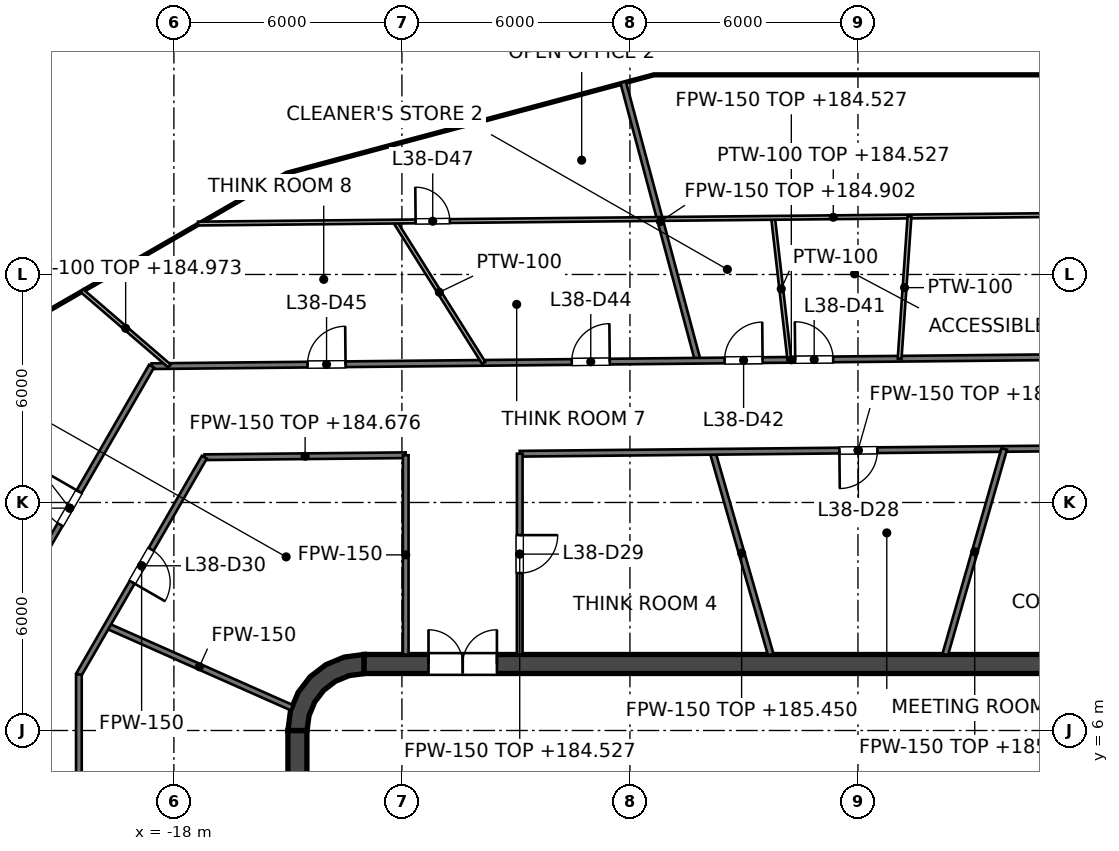
"""IFC4 building model, lengths in metres.
Left out: names, types, materials, properties, quantities, classifications, styles, units other than length and angle.
Written with IfcOpenShell. Run it as: python <this file> out.ifc"""

import sys

from ifc_helpers import new_model, si_unit, direction, frame, frame_2d, origin, place, context, subcontext, project, spatial, polyline, rectangle, outline, extrude, element, fill, save


model = new_model("IFC4")
c1 = context("Model", 3, precision=1e-05, world=origin(), true_north=direction((0.0, 1.0)))
c2 = subcontext(c1, "Body", "Model", "MODEL_VIEW")
j1 = project(units=[si_unit("LENGTHUNIT", "METRE"), si_unit("PLANEANGLEUNIT", "RADIAN")], contexts=[c1])
p1 = place(None, origin())
s1 = spatial("IfcSite", under=j1, at=p1, CompositionType="ELEMENT")
p2 = place(p1, origin())
s2 = spatial("IfcBuilding", under=s1, at=p2, CompositionType="ELEMENT")
p3 = place(p2, frame((0.0, 0.0, 181.6)))
s3 = spatial("IfcBuildingStorey", under=s2, at=p3, CompositionType="ELEMENT", Elevation=181.6)
p4 = place(p3, frame((-13.0, 7.75, 0.0), z_axis=(0.0, 0.0, 1.0), x_axis=(1.0, 0.0, 0.0)))
e1 = element("IfcWall", 1, at=p4, inside=s3, PredefinedType="SHEAR", context=c2, shape_type="SweptSolid", body=[
    extrude(rectangle(XDim=26.0, YDim=0.5, at=frame_2d((13.0, 0.0))), origin(), (0.0, 0.0, 1.0), 4.0),
])
p5 = place(p4, frame((1.7, 0.0, 0.0)))
e2 = element("IfcOpeningElement", 2, at=p5, cuts=e1, PredefinedType="OPENING", context=c2, shape_type="SweptSolid", body=[
    extrude(rectangle(XDim=1.8, YDim=2.1, at=frame_2d((0.9, 1.05))), frame((0.0, 0.25, 0.0), z_axis=(0.0, -1.0, 0.0), x_axis=(1.0, 0.0, 0.0)), (0.0, 0.0, 1.0), 0.5),
])
p6 = place(p4, frame((22.5, 0.0, 0.0)))
e3 = element("IfcOpeningElement", 3, at=p6, cuts=e1, PredefinedType="OPENING", context=c2, shape_type="SweptSolid", body=[
    extrude(rectangle(XDim=1.8, YDim=2.1, at=frame_2d((0.9, 1.05))), frame((0.0, 0.25, 0.0), z_axis=(0.0, -1.0, 0.0), x_axis=(1.0, 0.0, 0.0)), (0.0, 0.0, 1.0), 0.5),
])
p7 = place(p3, frame((-14.75, -6.0, 0.0), z_axis=(0.0, 0.0, 1.0), x_axis=(0.0, 1.0, 0.0)))
e4 = element("IfcWall", 4, at=p7, inside=s3, PredefinedType="SHEAR", context=c2, shape_type="SweptSolid", body=[
    extrude(rectangle(XDim=12.0, YDim=0.5, at=frame_2d((6.0, 0.0))), origin(), (0.0, 0.0, 1.0), 4.0),
])
p8 = place(p3, origin())
e5 = element("IfcWall", 5, at=p8, inside=s3, PredefinedType="SHEAR", context=c2, shape_type="SweptSolid", body=[
    extrude(outline(polyline([(-15.0, 6.0), (-14.496, 6.0), (-14.445, 6.387), (-14.295, 6.748), (-14.058, 7.058), (-13.748, 7.295), (-13.387, 7.445), (-13.0, 7.496), (-13.0, 8.0), (-13.518, 7.932), (-14.0, 7.732), (-14.414, 7.414), (-14.732, 7.0), (-14.932, 6.518), (-15.0, 6.0)])), origin(), (0.0, 0.0, 1.0), 4.0),
])
p9 = place(p3, frame((-9.0, 4.1, 0.0), z_axis=(0.0, 0.0, 1.0), x_axis=(0.0, 1.0, 0.0)))
e6 = element("IfcWall", 6, at=p9, inside=s3, PredefinedType="SOLIDWALL", context=c2, shape_type="SweptSolid", body=[
    extrude(rectangle(XDim=2.5, YDim=0.25, at=frame_2d((1.25, 0.0))), origin(), (0.0, 0.0, 1.0), 3.85),
])
p10 = place(p9, frame((0.65, 0.0, 0.0)))
e7 = element("IfcOpeningElement", 7, at=p10, cuts=e6, PredefinedType="OPENING", context=c2, shape_type="SweptSolid", body=[
    extrude(rectangle(XDim=1.2, YDim=2.1, at=frame_2d((0.6, 1.05))), frame((0.0, 0.125, 0.0), z_axis=(0.0, -1.0, 0.0), x_axis=(1.0, 0.0, 0.0)), (0.0, 0.0, 1.0), 0.25),
])
for number, where, z_axis, x_axis in (
    (8, (-3.15, 4.1, 0.0), (0.0, 0.0, 1.0), (0.0, 1.0, 0.0)),
    (9, (3.15, 4.1, 0.0), (0.0, 0.0, 1.0), (0.0, 1.0, 0.0)),
):
    element("IfcWall", number, at=place(p3, frame(where, z_axis=z_axis, x_axis=x_axis)), inside=s3, PredefinedType="SOLIDWALL", context=c2, shape_type="SweptSolid", body=[
        extrude(rectangle(XDim=2.5, YDim=0.25, at=frame_2d((1.25, 0.0))), origin(), (0.0, 0.0, 1.0), 3.85),
    ])
p11 = place(p3, frame((-9.125, 7.05, 0.0), z_axis=(0.0, 0.0, 1.0), x_axis=(1.0, 0.0, 0.0)))
e10 = element("IfcWall", 10, at=p11, inside=s3, PredefinedType="SOLIDWALL", context=c2, shape_type="SweptSolid", body=[
    extrude(rectangle(XDim=18.25, YDim=0.9, at=frame_2d((9.125, 0.0))), origin(), (0.0, 0.0, 1.0), 3.85),
])
p12 = place(p3, frame((-11.8, -7.5, 0.0), z_axis=(0.0, 0.0, 1.0), x_axis=(0.0, 1.0, 0.0)))
e11 = element("IfcWall", 11, at=p12, inside=s3, PredefinedType="SOLIDWALL", context=c2, shape_type="SweptSolid", body=[
    extrude(rectangle(XDim=15.0, YDim=0.4, at=frame_2d((7.5, 0.0))), origin(), (0.0, 0.0, 1.0), 3.85),
])
p13 = place(p12, frame((11.3, 0.0, 0.0)))
e12 = element("IfcOpeningElement", 12, at=p13, cuts=e11, PredefinedType="OPENING", context=c2, shape_type="SweptSolid", body=[
    extrude(rectangle(XDim=1.1, YDim=2.1, at=frame_2d((0.55, 1.05))), frame((0.0, 0.2, 0.0), z_axis=(0.0, -1.0, 0.0), x_axis=(1.0, 0.0, 0.0)), (0.0, 0.0, 1.0), 0.4),
])
p14 = place(p12, frame((8.4, 0.0, 0.0)))
e13 = element("IfcOpeningElement", 13, at=p14, cuts=e11, PredefinedType="OPENING", context=c2, shape_type="SweptSolid", body=[
    extrude(rectangle(XDim=1.1, YDim=2.1, at=frame_2d((0.55, 1.05))), frame((0.0, 0.2, 0.0), z_axis=(0.0, -1.0, 0.0), x_axis=(1.0, 0.0, 0.0)), (0.0, 0.0, 1.0), 0.4),
])
p15 = place(p12, frame((5.5, 0.0, 0.0)))
e14 = element("IfcOpeningElement", 14, at=p15, cuts=e11, PredefinedType="OPENING", context=c2, shape_type="SweptSolid", body=[
    extrude(rectangle(XDim=1.1, YDim=2.1, at=frame_2d((0.55, 1.05))), frame((0.0, 0.2, 0.0), z_axis=(0.0, -1.0, 0.0), x_axis=(1.0, 0.0, 0.0)), (0.0, 0.0, 1.0), 0.4),
])
p16 = place(p12, frame((13.697, 0.0, 0.0)))
e15 = element("IfcOpeningElement", 15, at=p16, cuts=e11, PredefinedType="OPENING", context=c2, shape_type="SweptSolid", body=[
    extrude(rectangle(XDim=0.9, YDim=2.1, at=frame_2d((0.45, 1.05))), frame((0.0, 0.2, 0.0), z_axis=(0.0, -1.0, 0.0), x_axis=(1.0, 0.0, 0.0)), (0.0, 0.0, 1.0), 0.4),
])
p17 = place(p12, frame((0.403, 0.0, 0.0)))
e16 = element("IfcOpeningElement", 16, at=p17, cuts=e11, PredefinedType="OPENING", context=c2, shape_type="SweptSolid", body=[
    extrude(rectangle(XDim=0.9, YDim=2.1, at=frame_2d((0.45, 1.05))), frame((0.0, 0.2, 0.0), z_axis=(0.0, -1.0, 0.0), x_axis=(1.0, 0.0, 0.0)), (0.0, 0.0, 1.0), 0.4),
])
e17 = element("IfcWall", 17, at=p8, inside=s3, PredefinedType="SOLIDWALL", context=c2, shape_type="SweptSolid", body=[
    extrude(outline(polyline([(-12.0, -5.925), (-12.0, -5.675), (-14.25, -5.675), (-14.25, -3.025), (-12.0, -3.025), (-12.0, -2.775), (-14.25, -2.775), (-14.25, -0.125), (-12.0, -0.125), (-12.0, 0.125), (-14.25, 0.125), (-14.25, 2.775), (-12.0, 2.775), (-12.0, 3.025), (-14.25, 3.025), (-14.25, 5.675), (-12.0, 5.675), (-12.0, 5.925), (-14.25, 5.925), (-14.5, 5.925), (-14.5, 5.675), (-14.5, 3.025), (-14.5, 2.775), (-14.5, 0.125), (-14.5, -0.125), (-14.5, -2.775), (-14.5, -3.025), (-14.5, -5.675), (-14.5, -5.925), (-14.25, -5.925), (-12.0, -5.925)])), origin(), (0.0, 0.0, 1.0), 3.85),
])
p18 = place(p3, frame((-6.178, 23.058, 0.0), z_axis=(0.0, 0.0, 1.0), x_axis=(0.258856186269, -0.965915873578, 0.0)))
e18 = element("IfcWall", 18, at=p18, inside=s3, PredefinedType="PARTITIONING", context=c2, shape_type="SweptSolid", body=[
    extrude(rectangle(XDim=7.587, YDim=0.15, at=frame_2d((3.793, 0.0))), origin(), (0.0, 0.0, 1.0), 3.302),
])
p19 = place(p3, frame((-3.827, 13.333, 0.0), z_axis=(0.0, 0.0, 1.0), x_axis=(0.275935525478, -0.961176147113, 0.0)))
e19 = element("IfcWall", 19, at=p19, inside=s3, PredefinedType="PARTITIONING", context=c2, shape_type="SweptSolid", body=[
    extrude(rectangle(XDim=5.548, YDim=0.15, at=frame_2d((2.774, 0.0))), origin(), (0.0, 0.0, 1.0), 3.85),
])
p20 = place(p3, frame((-19.76, 8.755, 0.0), z_axis=(0.0, 0.0, 1.0), x_axis=(0.91424834547, -0.405154245695, 0.0)))
e20 = element("IfcWall", 20, at=p20, inside=s3, PredefinedType="PARTITIONING", context=c2, shape_type="SweptSolid", body=[
    extrude(rectangle(XDim=5.318, YDim=0.15, at=frame_2d((2.659, 0.0))), origin(), (0.0, 0.0, 1.0), 2.995),
])
p21 = place(p3, frame((-17.194, 13.191, 0.0), z_axis=(0.0, 0.0, 1.0), x_axis=(0.999950394899, 0.009960308291, 0.0)))
e21 = element("IfcWall", 21, at=p21, inside=s3, PredefinedType="PARTITIONING", context=c2, shape_type="SweptSolid", body=[
    extrude(rectangle(XDim=5.294, YDim=0.15, at=frame_2d((2.647, 0.0))), origin(), (0.0, 0.0, 1.0), 3.076),
])
p22 = place(p3, frame((-8.9, 13.282, 0.0), z_axis=(0.0, 0.0, 1.0), x_axis=(0.99995056171, 0.009943547447, 0.0)))
e22 = element("IfcWall", 22, at=p22, inside=s3, PredefinedType="PARTITIONING", context=c2, shape_type="SweptSolid", body=[
    extrude(rectangle(XDim=17.801, YDim=0.15, at=frame_2d((8.9, 0.0))), origin(), (0.0, 0.0, 1.0), 2.927),
])
p23 = place(p22, frame((8.412, 0.0, 0.0)))
e23 = element("IfcOpeningElement", 23, at=p23, cuts=e22, PredefinedType="OPENING", context=c2, shape_type="SweptSolid", body=[
    extrude(rectangle(XDim=1.0, YDim=2.1, at=frame_2d((0.5, 1.05))), frame((0.0, 0.075, 0.0), z_axis=(0.0, -1.0, 0.0), x_axis=(1.0, 0.0, 0.0)), (0.0, 0.0, 1.0), 0.15),
])
p24 = place(p3, frame((-18.587, 15.587, 0.0), z_axis=(0.0, 0.0, 1.0), x_axis=(0.99995051, 0.009948746191, 0.0)))
e24 = element("IfcWall", 24, at=p24, inside=s3, PredefinedType="PARTITIONING", context=c2, shape_type="SweptSolid", body=[
    extrude(rectangle(XDim=33.669, YDim=0.15, at=frame_2d((16.834, 0.0))), origin(), (0.0, 0.0, 1.0), 2.927),
])
p25 = place(p24, frame((26.125, 0.0, 0.0)))
e25 = element("IfcOpeningElement", 25, at=p25, cuts=e24, PredefinedType="OPENING", context=c2, shape_type="SweptSolid", body=[
    extrude(rectangle(XDim=1.0, YDim=2.1, at=frame_2d((0.5, 1.05))), frame((0.0, 0.075, 0.0), z_axis=(0.0, -1.0, 0.0), x_axis=(1.0, 0.0, 0.0)), (0.0, 0.0, 1.0), 0.15),
])
p26 = place(p24, frame((16.936, 0.0, 0.0)))
e26 = element("IfcOpeningElement", 26, at=p26, cuts=e24, PredefinedType="OPENING", context=c2, shape_type="SweptSolid", body=[
    extrude(rectangle(XDim=1.0, YDim=2.1, at=frame_2d((0.5, 1.05))), frame((0.0, 0.075, 0.0), z_axis=(0.0, -1.0, 0.0), x_axis=(1.0, 0.0, 0.0)), (0.0, 0.0, 1.0), 0.15),
])
p27 = place(p24, frame((15.079, 0.0, 0.0)))
e27 = element("IfcOpeningElement", 27, at=p27, cuts=e24, PredefinedType="OPENING", context=c2, shape_type="SweptSolid", body=[
    extrude(rectangle(XDim=1.0, YDim=2.1, at=frame_2d((0.5, 1.05))), frame((0.0, 0.075, 0.0), z_axis=(0.0, -1.0, 0.0), x_axis=(1.0, 0.0, 0.0)), (0.0, 0.0, 1.0), 0.15),
])
p28 = place(p24, frame((11.056, 0.0, 0.0)))
e28 = element("IfcOpeningElement", 28, at=p28, cuts=e24, PredefinedType="OPENING", context=c2, shape_type="SweptSolid", body=[
    extrude(rectangle(XDim=1.0, YDim=2.1, at=frame_2d((0.5, 1.05))), frame((0.0, 0.075, 0.0), z_axis=(0.0, -1.0, 0.0), x_axis=(1.0, 0.0, 0.0)), (0.0, 0.0, 1.0), 0.15),
])
p29 = place(p24, frame((4.104, 0.0, 0.0)))
e29 = element("IfcOpeningElement", 29, at=p29, cuts=e24, PredefinedType="OPENING", context=c2, shape_type="SweptSolid", body=[
    extrude(rectangle(XDim=1.0, YDim=2.1, at=frame_2d((0.5, 1.05))), frame((0.0, 0.075, 0.0), z_axis=(0.0, -1.0, 0.0), x_axis=(1.0, 0.0, 0.0)), (0.0, 0.0, 1.0), 0.15),
])
p30 = place(p3, frame((-20.5, 7.474, 0.0), z_axis=(0.0, 0.0, 1.0), x_axis=(0.500012665616, 0.866018091164, 0.0)))
e30 = element("IfcWall", 30, at=p30, inside=s3, PredefinedType="PARTITIONING", context=c2, shape_type="SweptSolid", body=[
    extrude(rectangle(XDim=6.602, YDim=0.15, at=frame_2d((3.301, 0.0))), origin(), (0.0, 0.0, 1.0), 2.995),
])
p31 = place(p30, frame((2.803, 0.0, 0.0)))
e31 = element("IfcOpeningElement", 31, at=p31, cuts=e30, PredefinedType="OPENING", context=c2, shape_type="SweptSolid", body=[
    extrude(rectangle(XDim=1.0, YDim=2.1, at=frame_2d((0.5, 1.05))), frame((0.0, 0.075, 0.0), z_axis=(0.0, -1.0, 0.0), x_axis=(1.0, 0.0, 0.0)), (0.0, 0.0, 1.0), 0.15),
])
p32 = place(p3, frame((-22.9, 8.117, 0.0), z_axis=(0.0, 0.0, 1.0), x_axis=(0.499983791763, 0.866034761412, 0.0)))
e32 = element("IfcWall", 32, at=p32, inside=s3, PredefinedType="PARTITIONING", context=c2, shape_type="SweptSolid", body=[
    extrude(rectangle(XDim=8.626, YDim=0.15, at=frame_2d((4.313, 0.0))), origin(), (0.0, 0.0, 1.0), 2.995),
])
p33 = place(p32, frame((3.812, 0.0, 0.0)))
e33 = element("IfcOpeningElement", 33, at=p33, cuts=e32, PredefinedType="OPENING", context=c2, shape_type="SweptSolid", body=[
    extrude(rectangle(XDim=1.0, YDim=2.1, at=frame_2d((0.5, 1.05))), frame((0.0, 0.075, 0.0), z_axis=(0.0, -1.0, 0.0), x_axis=(1.0, 0.0, 0.0)), (0.0, 0.0, 1.0), 0.15),
])
p34 = place(p3, frame((2.296, 8.0, 0.0), z_axis=(0.0, 0.0, 1.0), x_axis=(0.275958345059, 0.961169595749, 0.0)))
e34 = element("IfcWall", 34, at=p34, inside=s3, PredefinedType="PARTITIONING", context=c2, shape_type="SweptSolid", body=[
    extrude(rectangle(XDim=5.628, YDim=0.15, at=frame_2d((2.814, 0.0))), origin(), (0.0, 0.0, 1.0), 3.85),
])
p35 = place(p3, frame((-8.9, 8.0, 0.0), z_axis=(0.0, 0.0, 1.0), x_axis=(0.0, 1.0, 0.0)))
e35 = element("IfcWall", 35, at=p35, inside=s3, PredefinedType="PARTITIONING", context=c2, shape_type="SweptSolid", body=[
    extrude(rectangle(XDim=5.283, YDim=0.15, at=frame_2d((2.642, 0.0))), origin(), (0.0, 0.0, 1.0), 2.927),
])
p36 = place(p35, frame((2.142, 0.0, 0.0)))
e36 = element("IfcOpeningElement", 36, at=p36, cuts=e35, PredefinedType="OPENING", context=c2, shape_type="SweptSolid", body=[
    extrude(rectangle(XDim=1.0, YDim=2.1, at=frame_2d((0.5, 1.05))), frame((0.0, 0.075, 0.0), z_axis=(0.0, -1.0, 0.0), x_axis=(1.0, 0.0, 0.0)), (0.0, 0.0, 1.0), 0.15),
])
p37 = place(p3, frame((-11.9, 8.0, 0.0), z_axis=(0.0, 0.0, 1.0), x_axis=(0.0, 1.0, 0.0)))
e37 = element("IfcWall", 37, at=p37, inside=s3, PredefinedType="PARTITIONING", context=c2, shape_type="SweptSolid", body=[
    extrude(rectangle(XDim=5.243, YDim=0.15, at=frame_2d((2.622, 0.0))), origin(), (0.0, 0.0, 1.0), 2.995),
])
p38 = place(p3, frame((-20.5, -7.095, 0.0), z_axis=(0.0, 0.0, 1.0), x_axis=(0.0, 1.0, 0.0)))
e38 = element("IfcWall", 38, at=p38, inside=s3, PredefinedType="PARTITIONING", context=c2, shape_type="SweptSolid", body=[
    extrude(rectangle(XDim=14.569, YDim=0.15, at=frame_2d((7.285, 0.0))), origin(), (0.0, 0.0, 1.0), 2.927),
])
p39 = place(p38, frame((10.234, 0.0, 0.0)))
e39 = element("IfcOpeningElement", 39, at=p39, cuts=e38, PredefinedType="OPENING", context=c2, shape_type="SweptSolid", body=[
    extrude(rectangle(XDim=1.0, YDim=2.1, at=frame_2d((0.5, 1.05))), frame((0.0, 0.075, 0.0), z_axis=(0.0, -1.0, 0.0), x_axis=(1.0, 0.0, 0.0)), (0.0, 0.0, 1.0), 0.15),
])
p40 = place(p38, frame((3.0, 0.0, 0.0)))
e40 = element("IfcOpeningElement", 40, at=p40, cuts=e38, PredefinedType="OPENING", context=c2, shape_type="SweptSolid", body=[
    extrude(rectangle(XDim=1.0, YDim=2.1, at=frame_2d((0.5, 1.05))), frame((0.0, 0.075, 0.0), z_axis=(0.0, -1.0, 0.0), x_axis=(1.0, 0.0, 0.0)), (0.0, 0.0, 1.0), 0.15),
])
p41 = place(p3, frame((-2.233, 19.49, 0.0), z_axis=(0.0, 0.0, 1.0), x_axis=(0.113808420458, -0.993502714356, 0.0)))
e41 = element("IfcWall", 41, at=p41, inside=s3, PredefinedType="PARTITIONING", context=c2, shape_type="SweptSolid", body=[
    extrude(rectangle(XDim=3.76, YDim=0.1, at=frame_2d((1.88, 0.0))), origin(), (0.0, 0.0, 1.0), 3.85),
])
p42 = place(p3, frame((-12.183, 19.391, 0.0), z_axis=(0.0, 0.0, 1.0), x_axis=(0.531972202613, -0.846761817542, 0.0)))
e42 = element("IfcWall", 42, at=p42, inside=s3, PredefinedType="PARTITIONING", context=c2, shape_type="SweptSolid", body=[
    extrude(rectangle(XDim=4.39, YDim=0.1, at=frame_2d((2.195, 0.0))), origin(), (0.0, 0.0, 1.0), 3.85),
])
p43 = place(p3, frame((-20.421, 17.575, 0.0), z_axis=(0.0, 0.0, 1.0), x_axis=(0.757939763132, -0.652324547648, 0.0)))
e43 = element("IfcWall", 43, at=p43, inside=s3, PredefinedType="PARTITIONING", context=c2, shape_type="SweptSolid", body=[
    extrude(rectangle(XDim=3.04, YDim=0.1, at=frame_2d((1.52, 0.0))), origin(), (0.0, 0.0, 1.0), 3.373),
])
p44 = place(p3, frame((-17.364, 19.34, 0.0), z_axis=(0.0, 0.0, 1.0), x_axis=(0.99995067692, 0.00993195487, 0.0)))
e44 = element("IfcWall", 44, at=p44, inside=s3, PredefinedType="PARTITIONING", context=c2, shape_type="SweptSolid", body=[
    extrude(rectangle(XDim=33.431, YDim=0.1, at=frame_2d((16.715, 0.0))), origin(), (0.0, 0.0, 1.0), 2.927),
])
p45 = place(p44, frame((25.126, 0.0, 0.0)))
e45 = element("IfcOpeningElement", 45, at=p45, cuts=e44, PredefinedType="OPENING", context=c2, shape_type="SweptSolid", body=[
    extrude(rectangle(XDim=0.9, YDim=2.1, at=frame_2d((0.45, 1.05))), frame((0.0, 0.05, 0.0), z_axis=(0.0, -1.0, 0.0), x_axis=(1.0, 0.0, 0.0)), (0.0, 0.0, 1.0), 0.1),
])
p46 = place(p44, frame((5.725, 0.0, 0.0)))
e46 = element("IfcOpeningElement", 46, at=p46, cuts=e44, PredefinedType="OPENING", context=c2, shape_type="SweptSolid", body=[
    extrude(rectangle(XDim=0.9, YDim=2.1, at=frame_2d((0.45, 1.05))), frame((0.0, 0.05, 0.0), z_axis=(0.0, -1.0, 0.0), x_axis=(1.0, 0.0, 0.0)), (0.0, 0.0, 1.0), 0.1),
])
p47 = place(p3, frame((1.096, 15.783, 0.0), z_axis=(0.0, 0.0, 1.0), x_axis=(0.06931808301, 0.99759460873, 0.0)))
e47 = element("IfcWall", 47, at=p47, inside=s3, PredefinedType="PARTITIONING", context=c2, shape_type="SweptSolid", body=[
    extrude(rectangle(XDim=3.751, YDim=0.1, at=frame_2d((1.875, 0.0))), origin(), (0.0, 0.0, 1.0), 3.85),
])
p48 = place(p10, origin())
e48 = element("IfcDoor", 48, at=p48, inside=s3, OperationType="SINGLE_SWING_RIGHT", PredefinedType="DOOR", context=c2, shape_type="SweptSolid", body=[
    extrude(rectangle(XDim=1.2, YDim=2.1, at=frame_2d((0.6, 1.05))), frame((0.0, 0.025, 0.0), z_axis=(0.0, -1.0, 0.0), x_axis=(1.0, 0.0, 0.0)), (0.0, 0.0, 1.0), 0.05),
])
fill(e7, e48)
p49 = place(p16, origin())
e49 = element("IfcDoor", 49, at=p49, inside=s3, OperationType="SINGLE_SWING_LEFT", PredefinedType="DOOR", context=c2, shape_type="SweptSolid", body=[
    extrude(rectangle(XDim=0.9, YDim=2.1, at=frame_2d((0.45, 1.05))), frame((0.0, 0.025, 0.0), z_axis=(0.0, -1.0, 0.0), x_axis=(1.0, 0.0, 0.0)), (0.0, 0.0, 1.0), 0.05),
])
fill(e15, e49)
p50 = place(p5, origin())
e50 = element("IfcDoor", 50, at=p50, inside=s3, OperationType="DOUBLE_DOOR_SINGLE_SWING", PredefinedType="DOOR", context=c2, shape_type="SweptSolid", body=[
    extrude(rectangle(XDim=1.8, YDim=2.1, at=frame_2d((0.9, 1.05))), frame((0.0, 0.025, 0.0), z_axis=(0.0, -1.0, 0.0), x_axis=(1.0, 0.0, 0.0)), (0.0, 0.0, 1.0), 0.05),
])
fill(e2, e50)
p51 = place(p23, origin())
e51 = element("IfcDoor", 51, at=p51, inside=s3, OperationType="SINGLE_SWING_LEFT", PredefinedType="DOOR", context=c2, shape_type="SweptSolid", body=[
    extrude(rectangle(XDim=1.0, YDim=2.1, at=frame_2d((0.5, 1.05))), frame((0.0, 0.025, 0.0), z_axis=(0.0, -1.0, 0.0), x_axis=(1.0, 0.0, 0.0)), (0.0, 0.0, 1.0), 0.05),
])
fill(e23, e51)
p52 = place(p36, origin())
e52 = element("IfcDoor", 52, at=p52, inside=s3, OperationType="SINGLE_SWING_RIGHT", PredefinedType="DOOR", context=c2, shape_type="SweptSolid", body=[
    extrude(rectangle(XDim=1.0, YDim=2.1, at=frame_2d((0.5, 1.05))), frame((0.0, 0.025, 0.0), z_axis=(0.0, -1.0, 0.0), x_axis=(1.0, 0.0, 0.0)), (0.0, 0.0, 1.0), 0.05),
])
fill(e36, e52)
p53 = place(p31, origin())
e53 = element("IfcDoor", 53, at=p53, inside=s3, OperationType="SINGLE_SWING_LEFT", PredefinedType="DOOR", context=c2, shape_type="SweptSolid", body=[
    extrude(rectangle(XDim=1.0, YDim=2.1, at=frame_2d((0.5, 1.05))), frame((0.0, 0.025, 0.0), z_axis=(0.0, -1.0, 0.0), x_axis=(1.0, 0.0, 0.0)), (0.0, 0.0, 1.0), 0.05),
])
fill(e31, e53)
p54 = place(p26, origin())
e54 = element("IfcDoor", 54, at=p54, inside=s3, OperationType="SINGLE_SWING_LEFT", PredefinedType="DOOR", context=c2, shape_type="SweptSolid", body=[
    extrude(rectangle(XDim=1.0, YDim=2.1, at=frame_2d((0.5, 1.05))), frame((0.0, 0.025, 0.0), z_axis=(0.0, -1.0, 0.0), x_axis=(1.0, 0.0, 0.0)), (0.0, 0.0, 1.0), 0.05),
])
fill(e26, e54)
p55 = place(p27, origin())
e55 = element("IfcDoor", 55, at=p55, inside=s3, OperationType="SINGLE_SWING_RIGHT", PredefinedType="DOOR", context=c2, shape_type="SweptSolid", body=[
    extrude(rectangle(XDim=1.0, YDim=2.1, at=frame_2d((0.5, 1.05))), frame((0.0, 0.025, 0.0), z_axis=(0.0, -1.0, 0.0), x_axis=(1.0, 0.0, 0.0)), (0.0, 0.0, 1.0), 0.05),
])
fill(e27, e55)
p56 = place(p28, origin())
e56 = element("IfcDoor", 56, at=p56, inside=s3, OperationType="SINGLE_SWING_RIGHT", PredefinedType="DOOR", context=c2, shape_type="SweptSolid", body=[
    extrude(rectangle(XDim=1.0, YDim=2.1, at=frame_2d((0.5, 1.05))), frame((0.0, 0.025, 0.0), z_axis=(0.0, -1.0, 0.0), x_axis=(1.0, 0.0, 0.0)), (0.0, 0.0, 1.0), 0.05),
])
fill(e28, e56)
p57 = place(p29, origin())
e57 = element("IfcDoor", 57, at=p57, inside=s3, OperationType="SINGLE_SWING_RIGHT", PredefinedType="DOOR", context=c2, shape_type="SweptSolid", body=[
    extrude(rectangle(XDim=1.0, YDim=2.1, at=frame_2d((0.5, 1.05))), frame((0.0, 0.025, 0.0), z_axis=(0.0, -1.0, 0.0), x_axis=(1.0, 0.0, 0.0)), (0.0, 0.0, 1.0), 0.05),
])
fill(e29, e57)
p58 = place(p33, origin())
e58 = element("IfcDoor", 58, at=p58, inside=s3, OperationType="SINGLE_SWING_RIGHT", PredefinedType="DOOR", context=c2, shape_type="SweptSolid", body=[
    extrude(rectangle(XDim=1.0, YDim=2.1, at=frame_2d((0.5, 1.05))), frame((0.0, 0.025, 0.0), z_axis=(0.0, -1.0, 0.0), x_axis=(1.0, 0.0, 0.0)), (0.0, 0.0, 1.0), 0.05),
])
fill(e33, e58)
p59 = place(p46, origin())
e59 = element("IfcDoor", 59, at=p59, inside=s3, OperationType="SINGLE_SWING_LEFT", PredefinedType="DOOR", context=c2, shape_type="SweptSolid", body=[
    extrude(rectangle(XDim=0.9, YDim=2.1, at=frame_2d((0.45, 1.05))), frame((0.0, 0.025, 0.0), z_axis=(0.0, -1.0, 0.0), x_axis=(1.0, 0.0, 0.0)), (0.0, 0.0, 1.0), 0.05),
])
fill(e46, e59)
save(model, sys.argv[1])
